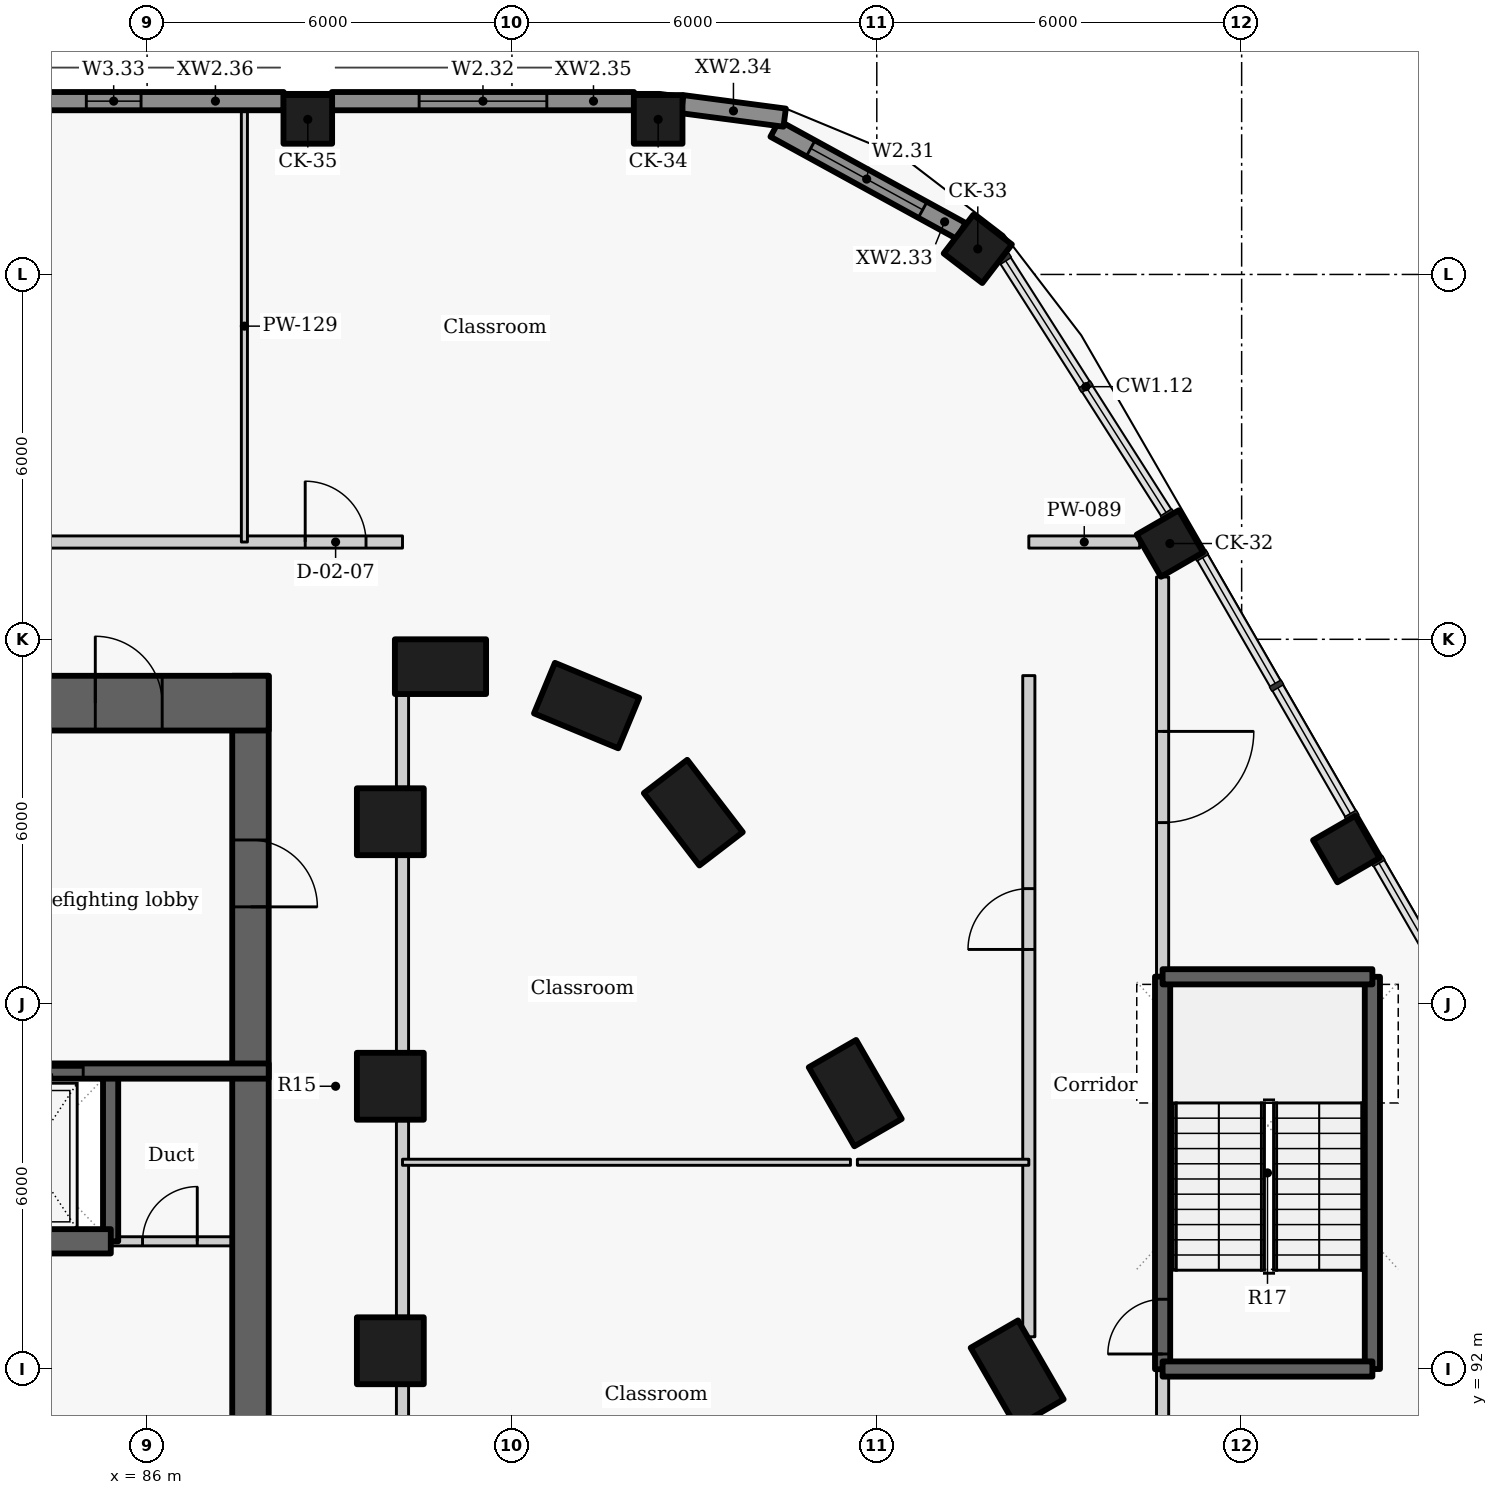
"""IFC4 building model, lengths in metres.
Left out: names, types, materials, properties, quantities, classifications, styles, units other than length and angle.
Written with IfcOpenShell. Run it as: python <this file> out.ifc"""

import sys

from ifc_helpers import new_model, si_unit, direction, frame, frame_2d, origin, origin_2d, place, context, subcontext, project, spatial, rectangle, extrude, element, fill, save


model = new_model("IFC4")
c1 = context("Model", 3, precision=1e-05, world=origin(), true_north=direction((0.0, 1.0)))
c2 = subcontext(c1, "Body", "Model", "MODEL_VIEW")
j1 = project(units=[si_unit("LENGTHUNIT", "METRE"), si_unit("PLANEANGLEUNIT", "RADIAN")], contexts=[c1])
p1 = place(None, origin())
s1 = spatial("IfcSite", under=j1, at=p1, CompositionType="ELEMENT")
p2 = place(p1, origin())
s2 = spatial("IfcBuilding", under=s1, at=p2, CompositionType="ELEMENT")
p3 = place(p2, frame((0.0, 0.0, 24.0)))
s3 = spatial("IfcBuildingStorey", under=s2, at=p3, CompositionType="ELEMENT", Elevation=24.0)
for number, where, z_axis, x_axis in (
    (1, (100.308, 91.925, 0.0), (0.0, 0.0, 1.0), (-0.5, 0.866, 0.0)),
    (2, (97.646, 96.537, 0.0), (0.0, 0.0, 1.0), (-0.5, 0.866, 0.0)),
    (3, (94.982, 101.149, 0.0), (0.0, 0.0, 1.0), (-0.609, 0.793, 0.0)),
    (4, (93.227, 102.91, 0.0), (0.0, 0.0, 1.0), (-0.924, 0.383, 0.0)),
    (5, (90.825, 103.55, 0.0), (0.0, 0.0, 1.0), (-1.0, 0.0, 0.0)),
):
    element("IfcColumn", number, at=place(p3, frame(where, z_axis=z_axis, x_axis=x_axis)), inside=s3, PredefinedType="COLUMN", context=c2, shape_type="SweptSolid", body=[
        extrude(rectangle(XDim=1.5, YDim=0.9, at=origin_2d()), origin(), (0.0, 0.0, 1.0), 4.2),
    ])
for number, where, z_axis, x_axis in (
    (6, (90.0, 92.3, 0.0), (0.0, 0.0, 1.0), (0.0, 1.0, 0.0)),
    (7, (90.0, 96.65, 0.0), (0.0, 0.0, 1.0), (0.0, 1.0, 0.0)),
    (8, (90.0, 101.0, 0.0), (0.0, 0.0, 1.0), (0.0, 1.0, 0.0)),
):
    element("IfcColumn", number, at=place(p3, frame(where, z_axis=z_axis, x_axis=x_axis)), inside=s3, PredefinedType="COLUMN", context=c2, shape_type="SweptSolid", body=[
        extrude(rectangle(XDim=1.1, YDim=1.1, at=origin_2d()), origin(), (0.0, 0.0, 1.0), 4.2),
    ])
for number, where, z_axis, x_axis in (
    (9, (105.721, 100.55, 0.0), (0.0, 0.0, 1.0), (-0.5, 0.866, 0.0)),
    (10, (102.82, 105.575, 0.0), (0.0, 0.0, 1.0), (-0.5, 0.866, 0.0)),
    (11, (99.661, 110.419, 0.0), (0.0, 0.0, 1.0), (-0.793, 0.609, 0.0)),
    (12, (94.404, 112.55, 0.0), (0.0, 0.0, 1.0), (-1.0, 0.0, 0.0)),
    (13, (88.643, 112.55, 0.0), (0.0, 0.0, 1.0), (-1.0, 0.0, 0.0)),
):
    element("IfcColumn", number, at=place(p3, frame(where, z_axis=z_axis, x_axis=x_axis)), inside=s3, PredefinedType="COLUMN", context=c2, shape_type="SweptSolid", body=[
        extrude(rectangle(XDim=0.8, YDim=0.8, at=origin_2d()), origin(), (0.0, 0.0, 1.0), 4.2),
    ])
p4 = place(p3, frame((99.389, 110.715, 0.0), z_axis=(0.0, 0.0, 1.0), x_axis=(-0.876785818174, 0.480881096581, 0.0)))
e14 = element("IfcWall", 14, at=p4, inside=s3, PredefinedType="SOLIDWALL", context=c2, shape_type="SweptSolid", body=[
    extrude(rectangle(XDim=3.497, YDim=0.3, at=frame_2d((1.748, 0.0))), origin(), (0.0, 0.0, 1.0), 3.325),
])
p5 = place(p4, frame((0.723, 0.0, 0.9)))
e15 = element("IfcOpeningElement", 15, at=p5, cuts=e14, PredefinedType="OPENING", context=c2, shape_type="SweptSolid", body=[
    extrude(rectangle(XDim=2.1, YDim=2.05, at=frame_2d((1.05, 1.025))), frame((0.0, 0.16, 0.0), z_axis=(0.0, -1.0, 0.0), x_axis=(1.0, 0.0, 0.0)), (0.0, 0.0, 1.0), 0.32),
])
p6 = place(p3, frame((96.485, 112.579, 0.0), z_axis=(0.0, 0.0, 1.0), x_axis=(-0.991431291018, 0.130629227937, 0.0)))
e16 = element("IfcWall", 16, at=p6, inside=s3, PredefinedType="SOLIDWALL", context=c2, shape_type="SweptSolid", body=[
    extrude(rectangle(XDim=1.699, YDim=0.3, at=frame_2d((0.85, 0.0))), origin(), (0.0, 0.0, 1.0), 3.325),
])
p7 = place(p3, frame((94.008, 112.85, 0.0), z_axis=(0.0, 0.0, 1.0), x_axis=(-1.0, 0.0, 0.0)))
e17 = element("IfcWall", 17, at=p7, inside=s3, PredefinedType="SOLIDWALL", context=c2, shape_type="SweptSolid", body=[
    extrude(rectangle(XDim=4.97, YDim=0.3, at=frame_2d((2.485, 0.0))), origin(), (0.0, 0.0, 1.0), 3.325),
])
p8 = place(p7, frame((1.435, 0.0, 0.9)))
e18 = element("IfcOpeningElement", 18, at=p8, cuts=e17, PredefinedType="OPENING", context=c2, shape_type="SweptSolid", body=[
    extrude(rectangle(XDim=2.1, YDim=2.05, at=frame_2d((1.05, 1.025))), frame((0.0, 0.16, 0.0), z_axis=(0.0, -1.0, 0.0), x_axis=(1.0, 0.0, 0.0)), (0.0, 0.0, 1.0), 0.32),
])
p9 = place(p3, frame((88.247, 112.85, 0.0), z_axis=(0.0, 0.0, 1.0), x_axis=(-1.0, 0.0, 0.0)))
e19 = element("IfcWall", 19, at=p9, inside=s3, PredefinedType="SOLIDWALL", context=c2, shape_type="SweptSolid", body=[
    extrude(rectangle(XDim=4.97, YDim=0.3, at=frame_2d((2.485, 0.0))), origin(), (0.0, 0.0, 1.0), 3.325),
])
p10 = place(p9, frame((2.346, 0.0, 1.5)))
e20 = element("IfcOpeningElement", 20, at=p10, cuts=e19, PredefinedType="OPENING", context=c2, shape_type="SweptSolid", body=[
    extrude(rectangle(XDim=0.9, YDim=1.45, at=frame_2d((0.45, 0.725))), frame((0.0, 0.16, 0.0), z_axis=(0.0, -1.0, 0.0), x_axis=(1.0, 0.0, 0.0)), (0.0, 0.0, 1.0), 0.32),
])
p11 = place(p3, frame((85.4, 94.1, -0.3), z_axis=(0.0, 0.0, 1.0), x_axis=(0.0, 1.0, 0.0)))
e21 = element("IfcWall", 21, at=p11, inside=s3, PredefinedType="SHEAR", context=c2, shape_type="SweptSolid", body=[
    extrude(rectangle(XDim=2.8, YDim=0.25, at=frame_2d((1.4, 0.0))), origin(), (0.0, 0.0, 1.0), 4.225),
])
p12 = place(p3, frame((87.7, 103.4, -0.3), z_axis=(0.0, 0.0, 1.0), x_axis=(0.0, -1.0, 0.0)))
e22 = element("IfcWall", 22, at=p12, inside=s3, PredefinedType="SHEAR", context=c2, shape_type="SweptSolid", body=[
    extrude(rectangle(XDim=15.6, YDim=0.6, at=frame_2d((7.8, 0.0))), origin(), (0.0, 0.0, 1.0), 4.225),
])
p13 = place(p12, frame((2.7, 0.0, 0.3)))
e23 = element("IfcOpeningElement", 23, at=p13, cuts=e22, PredefinedType="OPENING", context=c2, shape_type="SweptSolid", body=[
    extrude(rectangle(XDim=1.1, YDim=2.1, at=frame_2d((0.55, 1.05))), frame((0.0, 0.31, 0.0), z_axis=(0.0, -1.0, 0.0), x_axis=(1.0, 0.0, 0.0)), (0.0, 0.0, 1.0), 0.62),
])
p14 = place(p3, frame((85.397, 94.1, 0.0), z_axis=(0.0, 0.0, 1.0), x_axis=(1.0, 0.0, 0.0)))
e24 = element("IfcWall", 24, at=p14, inside=s3, PredefinedType="PARTITIONING", context=c2, shape_type="SweptSolid", body=[
    extrude(rectangle(XDim=2.603, YDim=0.15, at=frame_2d((1.302, 0.0))), origin(), (0.0, 0.0, 1.0), 3.925),
])
p15 = place(p14, frame((0.528, 0.0, 0.0)))
e25 = element("IfcOpeningElement", 25, at=p15, cuts=e24, PredefinedType="OPENING", context=c2, shape_type="SweptSolid", body=[
    extrude(rectangle(XDim=0.9, YDim=2.1, at=frame_2d((0.45, 1.05))), frame((0.0, 0.085, 0.0), z_axis=(0.0, -1.0, 0.0), x_axis=(1.0, 0.0, 0.0)), (0.0, 0.0, 1.0), 0.17),
])
p16 = place(p3, frame((82.697, 94.1, -0.3), z_axis=(0.0, 0.0, 1.0), x_axis=(1.0, 0.0, 0.0)))
e26 = element("IfcWall", 26, at=p16, inside=s3, PredefinedType="SHEAR", context=c2, shape_type="SweptSolid", body=[
    extrude(rectangle(XDim=2.706, YDim=0.4, at=frame_2d((1.353, 0.0))), origin(), (0.0, 0.0, 1.0), 4.225),
])
p17 = place(p3, frame((80.0, 96.9, -0.3), z_axis=(0.0, 0.0, 1.0), x_axis=(1.0, 0.0, 0.0)))
e27 = element("IfcWall", 27, at=p17, inside=s3, PredefinedType="SHEAR", context=c2, shape_type="SweptSolid", body=[
    extrude(rectangle(XDim=8.0, YDim=0.25, at=frame_2d((4.0, 0.0))), origin(), (0.0, 0.0, 1.0), 4.225),
])
p18 = place(p17, frame((3.849, 0.0, 0.3)))
e28 = element("IfcOpeningElement", 28, at=p18, cuts=e27, PredefinedType="OPENING", context=c2, shape_type="SweptSolid", body=[
    extrude(rectangle(XDim=1.1, YDim=2.1, at=frame_2d((0.55, 1.05))), frame((0.0, 0.135, 0.0), z_axis=(0.0, -1.0, 0.0), x_axis=(1.0, 0.0, 0.0)), (0.0, 0.0, 1.0), 0.27),
])
p19 = place(p3, frame((83.4, 102.95, -0.3), z_axis=(0.0, 0.0, 1.0), x_axis=(1.0, 0.0, 0.0)))
e29 = element("IfcWall", 29, at=p19, inside=s3, PredefinedType="SHEAR", context=c2, shape_type="SweptSolid", body=[
    extrude(rectangle(XDim=4.6, YDim=0.9, at=frame_2d((2.3, 0.0))), origin(), (0.0, 0.0, 1.0), 4.225),
])
p20 = place(p19, frame((1.748, 0.0, 0.3)))
e30 = element("IfcOpeningElement", 30, at=p20, cuts=e29, PredefinedType="OPENING", context=c2, shape_type="SweptSolid", body=[
    extrude(rectangle(XDim=1.1, YDim=2.1, at=frame_2d((0.55, 1.05))), frame((0.0, 0.46, 0.0), z_axis=(0.0, -1.0, 0.0), x_axis=(1.0, 0.0, 0.0)), (0.0, 0.0, 1.0), 0.92),
])
p21 = place(p3, frame((102.7, 91.997, -0.3), z_axis=(0.0, 0.0, 1.0), x_axis=(0.0, 1.0, 0.0)))
e31 = element("IfcWall", 31, at=p21, inside=s3, PredefinedType="SHEAR", context=c2, shape_type="SweptSolid", body=[
    extrude(rectangle(XDim=6.456, YDim=0.25, at=frame_2d((3.228, 0.0))), origin(), (0.0, 0.0, 1.0), 4.225),
])
p22 = place(p21, frame((0.25, 0.0, 0.3)))
e32 = element("IfcOpeningElement", 32, at=p22, cuts=e31, PredefinedType="OPENING", context=c2, shape_type="SweptSolid", body=[
    extrude(rectangle(XDim=0.9, YDim=2.1, at=frame_2d((0.45, 1.05))), frame((0.0, 0.135, 0.0), z_axis=(0.0, -1.0, 0.0), x_axis=(1.0, 0.0, 0.0)), (0.0, 0.0, 1.0), 0.27),
])
p23 = place(p3, frame((102.7, 88.467, 0.0), z_axis=(0.0, 0.0, 1.0), x_axis=(0.0, 1.0, 0.0)))
e33 = element("IfcWall", 33, at=p23, inside=s3, PredefinedType="PARTITIONING", context=c2, shape_type="SweptSolid", body=[
    extrude(rectangle(XDim=3.536, YDim=0.2, at=frame_2d((1.768, 0.0))), origin(), (0.0, 0.0, 1.0), 3.925),
])
p24 = place(p3, frame((102.7, 105.025, 0.0), z_axis=(0.0, 0.0, 1.0), x_axis=(0.0, -1.0, 0.0)))
e34 = element("IfcWall", 34, at=p24, inside=s3, PredefinedType="PARTITIONING", context=c2, shape_type="SweptSolid", body=[
    extrude(rectangle(XDim=6.578, YDim=0.2, at=frame_2d((3.289, 0.0))), origin(), (0.0, 0.0, 1.0), 3.925),
])
p25 = place(p24, frame((2.539, 0.0, 0.0)))
e35 = element("IfcOpeningElement", 35, at=p25, cuts=e34, PredefinedType="OPENING", context=c2, shape_type="SweptSolid", body=[
    extrude(rectangle(XDim=1.5, YDim=2.1, at=frame_2d((0.75, 1.05))), frame((0.0, 0.11, 0.0), z_axis=(0.0, -1.0, 0.0), x_axis=(1.0, 0.0, 0.0)), (0.0, 0.0, 1.0), 0.22),
])
p26 = place(p3, frame((100.5, 92.53, 0.0), z_axis=(0.0, 0.0, 1.0), x_axis=(0.0, 1.0, 0.0)))
e36 = element("IfcWall", 36, at=p26, inside=s3, PredefinedType="PARTITIONING", context=c2, shape_type="SweptSolid", body=[
    extrude(rectangle(XDim=10.873, YDim=0.2, at=frame_2d((5.437, 0.0))), origin(), (0.0, 0.0, 1.0), 3.925),
])
p27 = place(p26, frame((6.37, 0.0, 0.0)))
e37 = element("IfcOpeningElement", 37, at=p27, cuts=e36, PredefinedType="OPENING", context=c2, shape_type="SweptSolid", body=[
    extrude(rectangle(XDim=1.0, YDim=2.1, at=frame_2d((0.5, 1.05))), frame((0.0, 0.11, 0.0), z_axis=(0.0, -1.0, 0.0), x_axis=(1.0, 0.0, 0.0)), (0.0, 0.0, 1.0), 0.22),
])
p28 = place(p3, frame((69.8, 105.6, 0.0), z_axis=(0.0, 0.0, 1.0), x_axis=(1.0, 0.0, 0.0)))
e38 = element("IfcWall", 38, at=p28, inside=s3, PredefinedType="PARTITIONING", context=c2, shape_type="SweptSolid", body=[
    extrude(rectangle(XDim=20.4, YDim=0.2, at=frame_2d((10.2, 0.0))), origin(), (0.0, 0.0, 1.0), 3.925),
])
p29 = place(p28, frame((0.602, 0.0, 0.0)))
e39 = element("IfcOpeningElement", 39, at=p29, cuts=e38, PredefinedType="OPENING", context=c2, shape_type="SweptSolid", body=[
    extrude(rectangle(XDim=1.0, YDim=2.1, at=frame_2d((0.5, 1.05))), frame((0.0, 0.11, 0.0), z_axis=(0.0, -1.0, 0.0), x_axis=(1.0, 0.0, 0.0)), (0.0, 0.0, 1.0), 0.22),
])
p30 = place(p28, frame((18.8, 0.0, 0.0)))
e40 = element("IfcOpeningElement", 40, at=p30, cuts=e38, PredefinedType="OPENING", context=c2, shape_type="SweptSolid", body=[
    extrude(rectangle(XDim=1.0, YDim=2.1, at=frame_2d((0.5, 1.05))), frame((0.0, 0.11, 0.0), z_axis=(0.0, -1.0, 0.0), x_axis=(1.0, 0.0, 0.0)), (0.0, 0.0, 1.0), 0.22),
])
p31 = place(p28, frame((10.3, 0.0, 0.0)))
e41 = element("IfcOpeningElement", 41, at=p31, cuts=e38, PredefinedType="OPENING", context=c2, shape_type="SweptSolid", body=[
    extrude(rectangle(XDim=1.0, YDim=2.1, at=frame_2d((0.5, 1.05))), frame((0.0, 0.11, 0.0), z_axis=(0.0, -1.0, 0.0), x_axis=(1.0, 0.0, 0.0)), (0.0, 0.0, 1.0), 0.22),
])
p32 = place(p3, frame((100.5, 105.6, 0.0), z_axis=(0.0, 0.0, 1.0), x_axis=(1.0, 0.0, 0.0)))
e42 = element("IfcWall", 42, at=p32, inside=s3, PredefinedType="PARTITIONING", context=c2, shape_type="SweptSolid", body=[
    extrude(rectangle(XDim=1.823, YDim=0.2, at=frame_2d((0.912, 0.0))), origin(), (0.0, 0.0, 1.0), 3.925),
])
p33 = place(p3, frame((90.2, 88.517, 0.0), z_axis=(0.0, 0.0, 1.0), x_axis=(0.0, 1.0, 0.0)))
e43 = element("IfcWall", 43, at=p33, inside=s3, PredefinedType="PARTITIONING", context=c2, shape_type="SweptSolid", body=[
    extrude(rectangle(XDim=3.216, YDim=0.2, at=frame_2d((1.608, 0.0))), origin(), (0.0, 0.0, 1.0), 3.405),
])
for number, where, z_axis, x_axis in (
    (44, (90.2, 92.867, 0.0), (0.0, 0.0, 1.0), (0.0, 1.0, 0.0)),
    (45, (90.2, 97.217, 0.0), (0.0, 0.0, 1.0), (0.0, 1.0, 0.0)),
):
    element("IfcWall", number, at=place(p3, frame(where, z_axis=z_axis, x_axis=x_axis)), inside=s3, PredefinedType="PARTITIONING", context=c2, shape_type="SweptSolid", body=[
        extrude(rectangle(XDim=3.216, YDim=0.2, at=frame_2d((1.608, 0.0))), origin(), (0.0, 0.0, 1.0), 3.405),
    ])
p34 = place(p3, frame((90.2, 101.567, 0.0), z_axis=(0.0, 0.0, 1.0), x_axis=(0.0, 1.0, 0.0)))
e46 = element("IfcWall", 46, at=p34, inside=s3, PredefinedType="PARTITIONING", context=c2, shape_type="SweptSolid", body=[
    extrude(rectangle(XDim=1.516, YDim=0.2, at=frame_2d((0.758, 0.0))), origin(), (0.0, 0.0, 1.0), 3.925),
])
p35 = place(p3, frame((106.15, 92.0, -0.3), z_axis=(0.0, 0.0, 1.0), x_axis=(0.0, 1.0, 0.0)))
e47 = element("IfcWall", 47, at=p35, inside=s3, PredefinedType="SHEAR", context=c2, shape_type="SweptSolid", body=[
    extrude(rectangle(XDim=6.45, YDim=0.25, at=frame_2d((3.225, 0.0))), origin(), (0.0, 0.0, 1.0), 4.225),
])
for number, where, z_axis, x_axis in (
    (48, (102.7, 98.45, -0.3), (0.0, 0.0, 1.0), (1.0, 0.0, 0.0)),
    (49, (102.7, 92.0, -0.3), (0.0, 0.0, 1.0), (1.0, 0.0, 0.0)),
):
    element("IfcWall", number, at=place(p3, frame(where, z_axis=z_axis, x_axis=x_axis)), inside=s3, PredefinedType="SHEAR", context=c2, shape_type="SweptSolid", body=[
        extrude(rectangle(XDim=3.45, YDim=0.25, at=frame_2d((1.725, 0.0))), origin(), (0.0, 0.0, 1.0), 4.225),
    ])
p36 = place(p3, frame((90.2, 95.4, 0.0), z_axis=(0.0, 0.0, 1.0), x_axis=(1.0, 0.0, 0.0)))
e50 = element("IfcWall", 50, at=p36, inside=s3, PredefinedType="PARTITIONING", context=c2, shape_type="SweptSolid", body=[
    extrude(rectangle(XDim=7.366, YDim=0.1, at=frame_2d((3.683, 0.0))), origin(), (0.0, 0.0, 1.0), 3.925),
])
p37 = place(p3, frame((97.68, 95.4, 0.0), z_axis=(0.0, 0.0, 1.0), x_axis=(1.0, 0.0, 0.0)))
e51 = element("IfcWall", 51, at=p37, inside=s3, PredefinedType="PARTITIONING", context=c2, shape_type="SweptSolid", body=[
    extrude(rectangle(XDim=2.82, YDim=0.1, at=frame_2d((1.41, 0.0))), origin(), (0.0, 0.0, 1.0), 3.305),
])
p38 = place(p3, frame((87.6, 105.6, 0.0), z_axis=(0.0, 0.0, 1.0), x_axis=(0.0, 1.0, 0.0)))
e52 = element("IfcWall", 52, at=p38, inside=s3, PredefinedType="PARTITIONING", context=c2, shape_type="SweptSolid", body=[
    extrude(rectangle(XDim=7.1, YDim=0.1, at=frame_2d((3.55, 0.0))), origin(), (0.0, 0.0, 1.0), 3.925),
])
p39 = place(p5, origin())
e53 = element("IfcWindow", 53, at=p39, inside=s3, PartitioningType="SINGLE_PANEL", PredefinedType="WINDOW", context=c2, shape_type="SweptSolid", body=[
    extrude(rectangle(XDim=2.1, YDim=2.05, at=frame_2d((1.05, 1.025))), frame((0.0, 0.03, 0.0), z_axis=(0.0, -1.0, 0.0), x_axis=(1.0, 0.0, 0.0)), (0.0, 0.0, 1.0), 0.06),
])
fill(e15, e53)
p40 = place(p8, origin())
e54 = element("IfcWindow", 54, at=p40, inside=s3, PartitioningType="SINGLE_PANEL", PredefinedType="WINDOW", context=c2, shape_type="SweptSolid", body=[
    extrude(rectangle(XDim=2.1, YDim=2.05, at=frame_2d((1.05, 1.025))), frame((0.0, 0.03, 0.0), z_axis=(0.0, -1.0, 0.0), x_axis=(1.0, 0.0, 0.0)), (0.0, 0.0, 1.0), 0.06),
])
fill(e18, e54)
p41 = place(p10, origin())
e55 = element("IfcWindow", 55, at=p41, inside=s3, PartitioningType="SINGLE_PANEL", PredefinedType="WINDOW", context=c2, shape_type="SweptSolid", body=[
    extrude(rectangle(XDim=0.9, YDim=1.45, at=frame_2d((0.45, 0.725))), frame((0.0, 0.03, 0.0), z_axis=(0.0, -1.0, 0.0), x_axis=(1.0, 0.0, 0.0)), (0.0, 0.0, 1.0), 0.06),
])
fill(e20, e55)
p42 = place(p18, origin())
e56 = element("IfcDoor", 56, at=p42, inside=s3, OperationType="SLIDING_TO_LEFT", PredefinedType="DOOR", context=c2, shape_type="SweptSolid", body=[
    extrude(rectangle(XDim=1.1, YDim=2.1, at=frame_2d((0.55, 1.05))), frame((0.0, 0.025, 0.0), z_axis=(0.0, -1.0, 0.0), x_axis=(1.0, 0.0, 0.0)), (0.0, 0.0, 1.0), 0.05),
])
fill(e28, e56)
p43 = place(p15, origin())
e57 = element("IfcDoor", 57, at=p43, inside=s3, OperationType="SINGLE_SWING_RIGHT", PredefinedType="DOOR", context=c2, shape_type="SweptSolid", body=[
    extrude(rectangle(XDim=0.9, YDim=2.1, at=frame_2d((0.45, 1.05))), frame((0.0, 0.025, 0.0), z_axis=(0.0, -1.0, 0.0), x_axis=(1.0, 0.0, 0.0)), (0.0, 0.0, 1.0), 0.05),
])
fill(e25, e57)
p44 = place(p22, origin())
e58 = element("IfcDoor", 58, at=p44, inside=s3, OperationType="SINGLE_SWING_LEFT", PredefinedType="DOOR", context=c2, shape_type="SweptSolid", body=[
    extrude(rectangle(XDim=0.9, YDim=2.1, at=frame_2d((0.45, 1.05))), frame((0.0, 0.025, 0.0), z_axis=(0.0, -1.0, 0.0), x_axis=(1.0, 0.0, 0.0)), (0.0, 0.0, 1.0), 0.05),
])
fill(e32, e58)
p45 = place(p25, origin())
e59 = element("IfcDoor", 59, at=p45, inside=s3, OperationType="DOUBLE_DOOR_SINGLE_SWING", PredefinedType="DOOR", context=c2, shape_type="SweptSolid", body=[
    extrude(rectangle(XDim=1.5, YDim=2.1, at=frame_2d((0.75, 1.05))), frame((0.0, 0.025, 0.0), z_axis=(0.0, -1.0, 0.0), x_axis=(1.0, 0.0, 0.0)), (0.0, 0.0, 1.0), 0.05),
])
fill(e35, e59)
p46 = place(p27, origin())
e60 = element("IfcDoor", 60, at=p46, inside=s3, OperationType="SINGLE_SWING_LEFT", PredefinedType="DOOR", context=c2, shape_type="SweptSolid", body=[
    extrude(rectangle(XDim=1.0, YDim=2.1, at=frame_2d((0.5, 1.05))), frame((0.0, 0.025, 0.0), z_axis=(0.0, -1.0, 0.0), x_axis=(1.0, 0.0, 0.0)), (0.0, 0.0, 1.0), 0.05),
])
fill(e37, e60)
p47 = place(p30, origin())
e61 = element("IfcDoor", 61, at=p47, inside=s3, OperationType="SINGLE_SWING_LEFT", PredefinedType="DOOR", context=c2, shape_type="SweptSolid", body=[
    extrude(rectangle(XDim=1.0, YDim=2.1, at=frame_2d((0.5, 1.05))), frame((0.0, 0.025, 0.0), z_axis=(0.0, -1.0, 0.0), x_axis=(1.0, 0.0, 0.0)), (0.0, 0.0, 1.0), 0.05),
])
fill(e40, e61)
p48 = place(p13, origin())
e62 = element("IfcDoor", 62, at=p48, inside=s3, OperationType="SINGLE_SWING_RIGHT", PredefinedType="DOOR", context=c2, shape_type="SweptSolid", body=[
    extrude(rectangle(XDim=1.1, YDim=2.1, at=frame_2d((0.55, 1.05))), frame((0.0, 0.025, 0.0), z_axis=(0.0, -1.0, 0.0), x_axis=(1.0, 0.0, 0.0)), (0.0, 0.0, 1.0), 0.05),
])
fill(e23, e62)
p49 = place(p20, origin())
e63 = element("IfcDoor", 63, at=p49, inside=s3, OperationType="SINGLE_SWING_LEFT", PredefinedType="DOOR", context=c2, shape_type="SweptSolid", body=[
    extrude(rectangle(XDim=1.1, YDim=2.1, at=frame_2d((0.55, 1.05))), frame((0.0, 0.025, 0.0), z_axis=(0.0, -1.0, 0.0), x_axis=(1.0, 0.0, 0.0)), (0.0, 0.0, 1.0), 0.05),
])
fill(e30, e63)
save(model, sys.argv[1])
